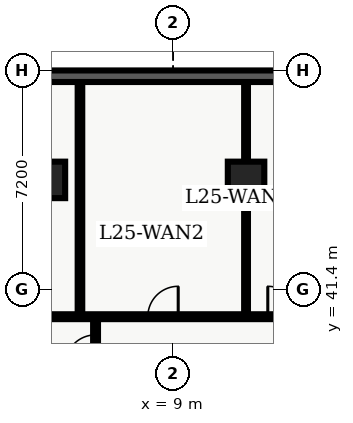
"""IFC4 building model, lengths in metres.
Left out: names, types, materials, properties, quantities, classifications, styles, units other than length and angle.
Written with IfcOpenShell. Run it as: python <this file> out.ifc"""

import sys

from ifc_helpers import new_model, entity, si_unit, converted_unit, direction, frame, origin_with_axes, origin_2d_with_axis, place, context, subcontext, project, spatial, polyline, rectangle, outline, extrude, element, fill, save


model = new_model("IFC4")
c1 = context("Model", 3, precision=1e-05, world=origin_with_axes(), true_north=direction((0.0, 1.0)))
c2 = subcontext(c1, "Body", "Model", "MODEL_VIEW")
j1 = project(units=[si_unit("LENGTHUNIT", "METRE"), converted_unit("PLANEANGLEUNIT", "DEGREE", entity("IfcPlaneAngleMeasure", 0.017), si_unit("PLANEANGLEUNIT", "RADIAN"), dimensions=[0, 0, 0, 0, 0, 0, 0])], contexts=[c1])
p1 = place(None, origin_with_axes())
s1 = spatial("IfcSite", under=j1, at=p1, CompositionType="ELEMENT")
p2 = place(p1, origin_with_axes())
s2 = spatial("IfcBuilding", under=s1, at=p2, CompositionType="ELEMENT")
p3 = place(p2, frame((0.0, 0.0, 104.7), z_axis=(0.0, 0.0, 1.0), x_axis=(1.0, 0.0, 0.0)))
s3 = spatial("IfcBuildingStorey", under=s2, at=p3, CompositionType="ELEMENT", Elevation=104.7)
for number, where, z_axis, x_axis in (
    (1, (11.4, 45.0, 0.0), (0.0, 0.0, 1.0), (1.0, 0.0, 0.0)),
    (2, (4.85, 45.0, 0.0), (0.0, 0.0, 1.0), (1.0, 0.0, 0.0)),
):
    element("IfcColumn", number, at=place(p3, frame(where, z_axis=z_axis, x_axis=x_axis)), inside=s3, PredefinedType="COLUMN", context=c2, shape_type="SweptSolid", body=[
        extrude(rectangle(XDim=1.2, YDim=1.2, at=origin_2d_with_axis()), origin_with_axes(), (0.0, 0.0, 1.0), 3.9),
    ])
p4 = place(p3, frame((2.6, 40.5, 0.0), z_axis=(0.0, 0.0, 1.0), x_axis=(1.0, 0.0, 0.0)))
e3 = element("IfcWall", 3, at=p4, inside=s3, PredefinedType="PARTITIONING", context=c2, shape_type="SweptSolid", body=[
    extrude(outline(polyline([(0.0, -0.08), (18.65, -0.08), (18.65, 0.08), (0.0, 0.08), (0.0, -0.08)])), origin_with_axes(), (0.0, 0.0, 1.0), 2.7),
])
p5 = place(p4, frame((1.663, 0.0, 0.0), z_axis=(0.0, 0.0, 1.0), x_axis=(1.0, 0.0, 0.0)))
e4 = element("IfcOpeningElement", 4, at=p5, cuts=e3, PredefinedType="OPENING", context=c2, shape_type="SweptSolid", body=[
    extrude(rectangle(XDim=1.0, YDim=0.18, at=origin_2d_with_axis()), origin_with_axes(), (0.0, 0.0, 1.0), 2.15),
])
p6 = place(p4, frame((6.069, 0.0, 0.0), z_axis=(0.0, 0.0, 1.0), x_axis=(1.0, 0.0, 0.0)))
e5 = element("IfcOpeningElement", 5, at=p6, cuts=e3, PredefinedType="OPENING", context=c2, shape_type="SweptSolid", body=[
    extrude(rectangle(XDim=1.0, YDim=0.18, at=origin_2d_with_axis()), origin_with_axes(), (0.0, 0.0, 1.0), 2.15),
])
p7 = place(p4, frame((10.015, 0.0, 0.0), z_axis=(0.0, 0.0, 1.0), x_axis=(1.0, 0.0, 0.0)))
e6 = element("IfcOpeningElement", 6, at=p7, cuts=e3, PredefinedType="OPENING", context=c2, shape_type="SweptSolid", body=[
    extrude(rectangle(XDim=1.0, YDim=0.18, at=origin_2d_with_axis()), origin_with_axes(), (0.0, 0.0, 1.0), 2.15),
])
p8 = place(p4, frame((13.825, 0.0, 0.0), z_axis=(0.0, 0.0, 1.0), x_axis=(1.0, 0.0, 0.0)))
e7 = element("IfcOpeningElement", 7, at=p8, cuts=e3, PredefinedType="OPENING", context=c2, shape_type="SweptSolid", body=[
    extrude(rectangle(XDim=1.0, YDim=0.18, at=origin_2d_with_axis()), origin_with_axes(), (0.0, 0.0, 1.0), 2.15),
])
p9 = place(p3, frame((6.45, 7.8, 0.0), z_axis=(0.0, 0.0, 1.0), x_axis=(0.0, 1.0, 0.0)))
e8 = element("IfcWall", 8, at=p9, inside=s3, PredefinedType="PARTITIONING", context=c2, shape_type="SweptSolid", body=[
    extrude(outline(polyline([(0.0, -0.08), (32.7, -0.08), (32.7, 0.08), (0.0, 0.08), (0.0, -0.08)])), origin_with_axes(), (0.0, 0.0, 1.0), 2.7),
])
p10 = place(p9, frame((4.582, 0.0, 0.0), z_axis=(0.0, 0.0, 1.0), x_axis=(1.0, 0.0, 0.0)))
e9 = element("IfcOpeningElement", 9, at=p10, cuts=e8, PredefinedType="OPENING", context=c2, shape_type="SweptSolid", body=[
    extrude(rectangle(XDim=1.0, YDim=0.18, at=origin_2d_with_axis()), origin_with_axes(), (0.0, 0.0, 1.0), 2.15),
])
p11 = place(p9, frame((10.304, 0.0, 0.0), z_axis=(0.0, 0.0, 1.0), x_axis=(1.0, 0.0, 0.0)))
e10 = element("IfcOpeningElement", 10, at=p11, cuts=e8, PredefinedType="OPENING", context=c2, shape_type="SweptSolid", body=[
    extrude(rectangle(XDim=1.0, YDim=0.18, at=origin_2d_with_axis()), origin_with_axes(), (0.0, 0.0, 1.0), 2.15),
])
p12 = place(p9, frame((18.512, 0.0, 0.0), z_axis=(0.0, 0.0, 1.0), x_axis=(1.0, 0.0, 0.0)))
e11 = element("IfcOpeningElement", 11, at=p12, cuts=e8, PredefinedType="OPENING", context=c2, shape_type="SweptSolid", body=[
    extrude(rectangle(XDim=1.0, YDim=0.18, at=origin_2d_with_axis()), origin_with_axes(), (0.0, 0.0, 1.0), 2.15),
])
p13 = place(p9, frame((25.142, 0.0, 0.0), z_axis=(0.0, 0.0, 1.0), x_axis=(1.0, 0.0, 0.0)))
e12 = element("IfcOpeningElement", 12, at=p13, cuts=e8, PredefinedType="OPENING", context=c2, shape_type="SweptSolid", body=[
    extrude(rectangle(XDim=1.0, YDim=0.18, at=origin_2d_with_axis()), origin_with_axes(), (0.0, 0.0, 1.0), 2.15),
])
p14 = place(p9, frame((31.602, 0.0, 0.0), z_axis=(0.0, 0.0, 1.0), x_axis=(1.0, 0.0, 0.0)))
e13 = element("IfcOpeningElement", 13, at=p14, cuts=e8, PredefinedType="OPENING", context=c2, shape_type="SweptSolid", body=[
    extrude(rectangle(XDim=1.0, YDim=0.18, at=origin_2d_with_axis()), origin_with_axes(), (0.0, 0.0, 1.0), 2.15),
])
p15 = place(p3, frame((5.937, 40.6, 0.0), z_axis=(0.0, 0.0, 1.0), x_axis=(0.0, 1.0, 0.0)))
e14 = element("IfcWall", 14, at=p15, inside=s3, PredefinedType="PARTITIONING", context=c2, shape_type="SweptSolid", body=[
    extrude(outline(polyline([(0.0, -0.075), (7.64, -0.075), (7.64, 0.075), (0.0, 0.075), (0.0, -0.075)])), origin_with_axes(), (0.0, 0.0, 1.0), 2.7),
])
p16 = place(p3, frame((11.4, 40.6, 0.0), z_axis=(0.0, 0.0, 1.0), x_axis=(0.0, 1.0, 0.0)))
e15 = element("IfcWall", 15, at=p16, inside=s3, PredefinedType="PARTITIONING", context=c2, shape_type="SweptSolid", body=[
    extrude(outline(polyline([(0.0, -0.062), (7.64, -0.062), (7.64, 0.062), (0.0, 0.062), (0.0, -0.062)])), origin_with_axes(), (0.0, 0.0, 1.0), 2.7),
])
p17 = place(p3, frame((2.78, 48.41, 0.0), z_axis=(0.0, 0.0, 1.0), x_axis=(1.0, 0.0, 0.0)))
e16 = element("IfcWall", 16, at=p17, inside=s3, PredefinedType="SOLIDWALL", context=c2, shape_type="SweptSolid", body=[
    extrude(outline(polyline([(0.0, -0.19), (16.42, -0.19), (16.42, 0.19), (0.0, 0.19), (0.0, -0.19)])), origin_with_axes(), (0.0, 0.0, 1.0), 3.66),
])
p18 = place(p17, frame((13.283, 0.0, 0.45), z_axis=(0.0, 0.0, 1.0), x_axis=(1.0, 0.0, 0.0)))
e17 = element("IfcOpeningElement", 17, at=p18, cuts=e16, PredefinedType="OPENING", context=c2, shape_type="SweptSolid", body=[
    extrude(rectangle(XDim=2.1, YDim=0.4, at=origin_2d_with_axis()), origin_with_axes(), (0.0, 0.0, 1.0), 2.2),
])
p19 = place(p9, frame((31.602, 0.0, 0.0), z_axis=(0.0, 0.0, 1.0), x_axis=(1.0, 0.0, 0.0)))
e18 = element("IfcDoor", 18, at=p19, inside=s3, OperationType="SINGLE_SWING_LEFT", PredefinedType="DOOR", context=c2, shape_type="SweptSolid", body=[
    extrude(rectangle(XDim=1.0, YDim=0.09, at=origin_2d_with_axis()), origin_with_axes(), (0.0, 0.0, 1.0), 2.15),
])
fill(e13, e18)
p20 = place(p4, frame((6.069, 0.0, 0.0), z_axis=(0.0, 0.0, 1.0), x_axis=(1.0, 0.0, 0.0)))
e19 = element("IfcDoor", 19, at=p20, inside=s3, OperationType="SINGLE_SWING_RIGHT", PredefinedType="DOOR", context=c2, shape_type="SweptSolid", body=[
    extrude(rectangle(XDim=1.0, YDim=0.09, at=origin_2d_with_axis()), origin_with_axes(), (0.0, 0.0, 1.0), 2.15),
])
fill(e5, e19)
p21 = place(p4, frame((10.015, 0.0, 0.0), z_axis=(0.0, 0.0, 1.0), x_axis=(1.0, 0.0, 0.0)))
e20 = element("IfcDoor", 20, at=p21, inside=s3, OperationType="SINGLE_SWING_LEFT", PredefinedType="DOOR", context=c2, shape_type="SweptSolid", body=[
    extrude(rectangle(XDim=1.0, YDim=0.09, at=origin_2d_with_axis()), origin_with_axes(), (0.0, 0.0, 1.0), 2.15),
])
fill(e6, e20)
save(model, sys.argv[1])
